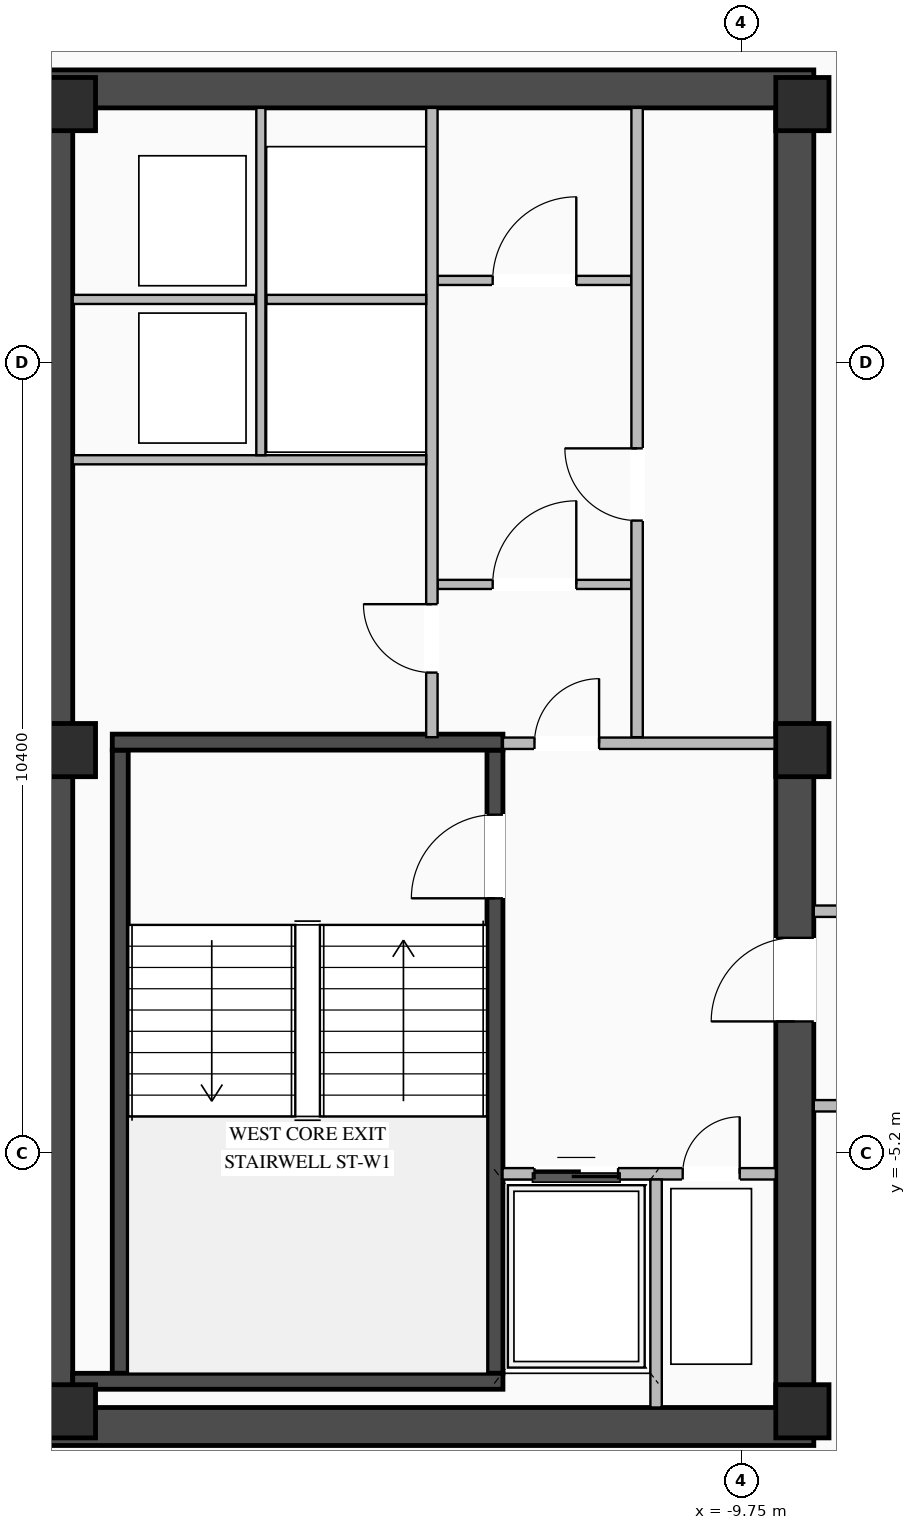
"""IFC4 building model, lengths in metres.
Left out: names, types, materials, properties, quantities, classifications, styles, units other than length and angle.
Written with IfcOpenShell. Run it as: python <this file> out.ifc"""

import sys

from ifc_helpers import new_model, si_unit, direction, frame, frame_2d, origin, origin_2d, place, context, subcontext, project, spatial, rectangle, extrude, element, fill, save


model = new_model("IFC4")
c1 = context("Model", 3, precision=1e-05, world=origin(), true_north=direction((0.0, 1.0)))
c2 = subcontext(c1, "Body", "Model", "MODEL_VIEW")
j1 = project(units=[si_unit("LENGTHUNIT", "METRE"), si_unit("PLANEANGLEUNIT", "RADIAN")], contexts=[c1])
p1 = place(None, origin())
s1 = spatial("IfcSite", under=j1, at=p1, CompositionType="ELEMENT")
p2 = place(p1, origin())
s2 = spatial("IfcBuilding", under=s1, at=p2, CompositionType="ELEMENT")
p3 = place(p2, frame((0.0, 0.0, 286.95)))
s3 = spatial("IfcBuildingStorey", under=s2, at=p3, CompositionType="ELEMENT", Elevation=286.95)
for number, where, z_axis, x_axis in (
    (1, (-19.05, -8.8, 0.0), (0.0, 0.0, 1.0), (1.0, 0.0, 0.0)),
    (2, (-19.05, 8.8, 0.0), (0.0, 0.0, 1.0), (1.0, 0.0, 0.0)),
):
    element("IfcWall", number, at=place(p3, frame(where, z_axis=z_axis, x_axis=x_axis)), inside=s3, PredefinedType="SHEAR", context=c2, shape_type="SweptSolid", body=[
        extrude(rectangle(XDim=10.25, YDim=0.5, at=frame_2d((5.125, 0.0))), origin(), (0.0, 0.0, 1.0), 3.35),
    ])
p4 = place(p3, frame((-18.8, -8.55, 0.0), z_axis=(0.0, 0.0, 1.0), x_axis=(0.0, 1.0, 0.0)))
e3 = element("IfcWall", 3, at=p4, inside=s3, PredefinedType="SHEAR", context=c2, shape_type="SweptSolid", body=[
    extrude(rectangle(XDim=17.1, YDim=0.5, at=frame_2d((8.55, 0.0))), origin(), (0.0, 0.0, 1.0), 3.35),
])
p5 = place(p3, frame((-9.05, -8.55, 0.0), z_axis=(0.0, 0.0, 1.0), x_axis=(0.0, 1.0, 0.0)))
e4 = element("IfcWall", 4, at=p5, inside=s3, PredefinedType="SHEAR", context=c2, shape_type="SweptSolid", body=[
    extrude(rectangle(XDim=17.1, YDim=0.5, at=frame_2d((8.55, 0.0))), origin(), (0.0, 0.0, 1.0), 3.35),
])
p6 = place(p5, frame((5.08, 0.0, 0.0)))
e5 = element("IfcOpeningElement", 5, at=p6, cuts=e4, PredefinedType="OPENING", context=c2, shape_type="SweptSolid", body=[
    extrude(rectangle(XDim=1.1, YDim=2.08, at=frame_2d((0.55, 1.04))), frame((0.0, 0.26, 0.0), z_axis=(0.0, -1.0, 0.0), x_axis=(1.0, 0.0, 0.0)), (0.0, 0.0, 1.0), 0.52),
])
p7 = place(p3, frame((-12.995, -8.1, 0.0), z_axis=(0.0, 0.0, 1.0), x_axis=(0.0, 1.0, 0.0)))
e6 = element("IfcWall", 6, at=p7, inside=s3, PredefinedType="SHEAR", context=c2, shape_type="SweptSolid", body=[
    extrude(rectangle(XDim=8.2, YDim=0.21, at=frame_2d((4.1, 0.0))), origin(), (0.0, 0.0, 1.0), 3.35),
])
p8 = place(p7, frame((6.25, 0.0, 0.0)))
e7 = element("IfcOpeningElement", 7, at=p8, cuts=e6, PredefinedType="OPENING", context=c2, shape_type="SweptSolid", body=[
    extrude(rectangle(XDim=1.1, YDim=2.15, at=frame_2d((0.55, 1.075))), frame((0.0, 0.115, 0.0), z_axis=(0.0, -1.0, 0.0), x_axis=(1.0, 0.0, 0.0)), (0.0, 0.0, 1.0), 0.23),
])
p9 = place(p3, frame((-17.925, -8.1, 0.0), z_axis=(0.0, 0.0, 1.0), x_axis=(0.0, 1.0, 0.0)))
e8 = element("IfcWall", 8, at=p9, inside=s3, PredefinedType="SHEAR", context=c2, shape_type="SweptSolid", body=[
    extrude(rectangle(XDim=8.2, YDim=0.21, at=frame_2d((4.1, 0.0))), origin(), (0.0, 0.0, 1.0), 3.35),
])
p10 = place(p3, frame((-18.55, -8.205, 0.0), z_axis=(0.0, 0.0, 1.0), x_axis=(1.0, 0.0, 0.0)))
e9 = element("IfcWall", 9, at=p10, inside=s3, PredefinedType="SHEAR", context=c2, shape_type="SweptSolid", body=[
    extrude(rectangle(XDim=5.66, YDim=0.21, at=frame_2d((2.83, 0.0))), origin(), (0.0, 0.0, 1.0), 3.35),
])
p11 = place(p3, frame((-12.89, 0.205, 0.0), z_axis=(0.0, 0.0, 1.0), x_axis=(-1.0, 0.0, 0.0)))
e10 = element("IfcWall", 10, at=p11, inside=s3, PredefinedType="SHEAR", context=c2, shape_type="SweptSolid", body=[
    extrude(rectangle(XDim=5.14, YDim=0.21, at=frame_2d((2.57, 0.0))), origin(), (0.0, 0.0, 1.0), 3.35),
])
for number, where, z_axis, x_axis in (
    (11, (-8.95, -8.6, 0.0), (0.0, 0.0, 1.0), (1.0, 0.0, 0.0)),
    (12, (-8.95, 0.1, 0.0), (0.0, 0.0, 1.0), (1.0, 0.0, 0.0)),
    (13, (-8.95, 8.6, 0.0), (0.0, 0.0, 1.0), (1.0, 0.0, 0.0)),
    (14, (-18.6, -8.6, 0.0), (0.0, 0.0, 1.0), (1.0, 0.0, 0.0)),
    (15, (-18.6, 0.1, 0.0), (0.0, 0.0, 1.0), (1.0, 0.0, 0.0)),
    (16, (-18.6, 8.6, 0.0), (0.0, 0.0, 1.0), (1.0, 0.0, 0.0)),
):
    element("IfcColumn", number, at=place(p3, frame(where, z_axis=z_axis, x_axis=x_axis)), inside=s3, PredefinedType="COLUMN", context=c2, shape_type="SweptSolid", body=[
        extrude(rectangle(XDim=0.7, YDim=0.7, at=origin_2d()), origin(), (0.0, 0.0, 1.0), 3.6),
    ])
p12 = place(p3, frame((-12.895, -5.475, 0.0), z_axis=(0.0, 0.0, 1.0), x_axis=(1.0, 0.0, 0.0)))
e17 = element("IfcWall", 17, at=p12, inside=s3, PredefinedType="STANDARD", context=c2, shape_type="SweptSolid", body=[
    extrude(rectangle(XDim=3.595, YDim=0.15, at=frame_2d((1.797, 0.0))), origin(), (0.0, 0.0, 1.0), 3.33),
])
p13 = place(p12, frame((0.42, 0.0, 0.0)))
e18 = element("IfcOpeningElement", 18, at=p13, cuts=e17, PredefinedType="OPENING", context=c2, shape_type="SweptSolid", body=[
    extrude(rectangle(XDim=1.1, YDim=2.15, at=frame_2d((0.55, 1.075))), frame((0.0, 0.085, 0.0), z_axis=(0.0, -1.0, 0.0), x_axis=(1.0, 0.0, 0.0)), (0.0, 0.0, 1.0), 0.17),
])
p14 = place(p12, frame((2.37, 0.0, 0.0)))
e19 = element("IfcOpeningElement", 19, at=p14, cuts=e17, PredefinedType="OPENING", context=c2, shape_type="SweptSolid", body=[
    extrude(rectangle(XDim=0.75, YDim=2.05, at=frame_2d((0.375, 1.025))), frame((0.0, 0.085, 0.0), z_axis=(0.0, -1.0, 0.0), x_axis=(1.0, 0.0, 0.0)), (0.0, 0.0, 1.0), 0.17),
])
p15 = place(p3, frame((-10.875, -8.55, 0.0), z_axis=(0.0, 0.0, 1.0), x_axis=(0.0, 1.0, 0.0)))
e20 = element("IfcWall", 20, at=p15, inside=s3, PredefinedType="STANDARD", context=c2, shape_type="SweptSolid", body=[
    extrude(rectangle(XDim=3.0, YDim=0.15, at=frame_2d((1.5, 0.0))), origin(), (0.0, 0.0, 1.0), 3.33),
])
p16 = place(p3, frame((-12.89, 0.19, 0.0), z_axis=(0.0, 0.0, 1.0), x_axis=(1.0, 0.0, 0.0)))
e21 = element("IfcWall", 21, at=p16, inside=s3, PredefinedType="STANDARD", context=c2, shape_type="SweptSolid", body=[
    extrude(rectangle(XDim=3.59, YDim=0.15, at=frame_2d((1.795, 0.0))), origin(), (0.0, 0.0, 1.0), 2.825),
])
p17 = place(p16, frame((0.415, 0.0, 0.0)))
e22 = element("IfcOpeningElement", 22, at=p17, cuts=e21, PredefinedType="OPENING", context=c2, shape_type="SweptSolid", body=[
    extrude(rectangle(XDim=0.85, YDim=2.04, at=frame_2d((0.425, 1.02))), frame((0.0, 0.085, 0.0), z_axis=(0.0, -1.0, 0.0), x_axis=(1.0, 0.0, 0.0)), (0.0, 0.0, 1.0), 0.17),
])
p18 = place(p3, frame((-13.75, 2.28, 0.0), z_axis=(0.0, 0.0, 1.0), x_axis=(1.0, 0.0, 0.0)))
e23 = element("IfcWall", 23, at=p18, inside=s3, PredefinedType="STANDARD", context=c2, shape_type="SweptSolid", body=[
    extrude(rectangle(XDim=2.55, YDim=0.12, at=frame_2d((1.275, 0.0))), origin(), (0.0, 0.0, 1.0), 3.33),
])
p19 = place(p18, frame((0.725, 0.0, 0.0)))
e24 = element("IfcOpeningElement", 24, at=p19, cuts=e23, PredefinedType="OPENING", context=c2, shape_type="SweptSolid", body=[
    extrude(rectangle(XDim=1.1, YDim=2.1, at=frame_2d((0.55, 1.05))), frame((0.0, 0.07, 0.0), z_axis=(0.0, -1.0, 0.0), x_axis=(1.0, 0.0, 0.0)), (0.0, 0.0, 1.0), 0.14),
])
p20 = place(p3, frame((-13.75, 6.28, 0.0), z_axis=(0.0, 0.0, 1.0), x_axis=(1.0, 0.0, 0.0)))
e25 = element("IfcWall", 25, at=p20, inside=s3, PredefinedType="STANDARD", context=c2, shape_type="SweptSolid", body=[
    extrude(rectangle(XDim=2.55, YDim=0.12, at=frame_2d((1.275, 0.0))), origin(), (0.0, 0.0, 1.0), 3.33),
])
p21 = place(p20, frame((0.725, 0.0, 0.0)))
e26 = element("IfcOpeningElement", 26, at=p21, cuts=e25, PredefinedType="OPENING", context=c2, shape_type="SweptSolid", body=[
    extrude(rectangle(XDim=1.1, YDim=2.1, at=frame_2d((0.55, 1.05))), frame((0.0, 0.07, 0.0), z_axis=(0.0, -1.0, 0.0), x_axis=(1.0, 0.0, 0.0)), (0.0, 0.0, 1.0), 0.14),
])
p22 = place(p3, frame((-11.125, 0.27, 0.0), z_axis=(0.0, 0.0, 1.0), x_axis=(0.0, 1.0, 0.0)))
e27 = element("IfcWall", 27, at=p22, inside=s3, PredefinedType="STANDARD", context=c2, shape_type="SweptSolid", body=[
    extrude(rectangle(XDim=8.28, YDim=0.15, at=frame_2d((4.14, 0.0))), origin(), (0.0, 0.0, 1.0), 3.33),
])
p23 = place(p22, frame((2.85, 0.0, 0.0)))
e28 = element("IfcOpeningElement", 28, at=p23, cuts=e27, PredefinedType="OPENING", context=c2, shape_type="SweptSolid", body=[
    extrude(rectangle(XDim=0.95, YDim=2.05, at=frame_2d((0.475, 1.025))), frame((0.0, 0.085, 0.0), z_axis=(0.0, -1.0, 0.0), x_axis=(1.0, 0.0, 0.0)), (0.0, 0.0, 1.0), 0.17),
])
p24 = place(p3, frame((-13.825, 0.27, 0.0), z_axis=(0.0, 0.0, 1.0), x_axis=(0.0, 1.0, 0.0)))
e29 = element("IfcWall", 29, at=p24, inside=s3, PredefinedType="STANDARD", context=c2, shape_type="SweptSolid", body=[
    extrude(rectangle(XDim=8.28, YDim=0.15, at=frame_2d((4.14, 0.0))), origin(), (0.0, 0.0, 1.0), 3.33),
])
p25 = place(p24, frame((0.85, 0.0, 0.0)))
e30 = element("IfcOpeningElement", 30, at=p25, cuts=e29, PredefinedType="OPENING", context=c2, shape_type="SweptSolid", body=[
    extrude(rectangle(XDim=0.9, YDim=2.05, at=frame_2d((0.45, 1.025))), frame((0.0, 0.085, 0.0), z_axis=(0.0, -1.0, 0.0), x_axis=(1.0, 0.0, 0.0)), (0.0, 0.0, 1.0), 0.17),
])
p26 = place(p3, frame((-18.55, 3.92, 0.0), z_axis=(0.0, 0.0, 1.0), x_axis=(1.0, 0.0, 0.0)))
e31 = element("IfcWall", 31, at=p26, inside=s3, PredefinedType="STANDARD", context=c2, shape_type="SweptSolid", body=[
    extrude(rectangle(XDim=4.65, YDim=0.12, at=frame_2d((2.325, 0.0))), origin(), (0.0, 0.0, 1.0), 3.33),
])
p27 = place(p3, frame((-18.55, 6.03, 0.0), z_axis=(0.0, 0.0, 1.0), x_axis=(1.0, 0.0, 0.0)))
e32 = element("IfcWall", 32, at=p27, inside=s3, PredefinedType="STANDARD", context=c2, shape_type="SweptSolid", body=[
    extrude(rectangle(XDim=2.4, YDim=0.12, at=frame_2d((1.2, 0.0))), origin(), (0.0, 0.0, 1.0), 3.33),
])
p28 = place(p3, frame((-16.075, 3.98, 0.0), z_axis=(0.0, 0.0, 1.0), x_axis=(0.0, 1.0, 0.0)))
e33 = element("IfcWall", 33, at=p28, inside=s3, PredefinedType="STANDARD", context=c2, shape_type="SweptSolid", body=[
    extrude(rectangle(XDim=4.57, YDim=0.12, at=frame_2d((2.285, 0.0))), origin(), (0.0, 0.0, 1.0), 3.33),
])
p29 = place(p3, frame((-16.0, 6.03, 0.0), z_axis=(0.0, 0.0, 1.0), x_axis=(1.0, 0.0, 0.0)))
e34 = element("IfcWall", 34, at=p29, inside=s3, PredefinedType="STANDARD", context=c2, shape_type="SweptSolid", body=[
    extrude(rectangle(XDim=2.1, YDim=0.12, at=frame_2d((1.05, 0.0))), origin(), (0.0, 0.0, 1.0), 3.33),
])
p30 = place(p3, frame((-8.8, -2.02, 0.0), z_axis=(0.0, 0.0, 1.0), x_axis=(1.0, 0.0, 0.0)))
e35 = element("IfcWall", 35, at=p30, inside=s3, PredefinedType="STANDARD", context=c2, shape_type="SweptSolid", body=[
    extrude(rectangle(XDim=17.6, YDim=0.15, at=frame_2d((8.8, 0.0))), origin(), (0.0, 0.0, 1.0), 3.33),
])
p31 = place(p30, frame((4.6, 0.0, 0.0)))
e36 = element("IfcOpeningElement", 36, at=p31, cuts=e35, PredefinedType="OPENING", context=c2, shape_type="SweptSolid", body=[
    extrude(rectangle(XDim=1.0, YDim=2.02, at=frame_2d((0.5, 1.01))), frame((0.0, 0.085, 0.0), z_axis=(0.0, -1.0, 0.0), x_axis=(1.0, 0.0, 0.0)), (0.0, 0.0, 1.0), 0.17),
])
p32 = place(p30, frame((13.4, 0.0, 0.0)))
e37 = element("IfcOpeningElement", 37, at=p32, cuts=e35, PredefinedType="OPENING", context=c2, shape_type="SweptSolid", body=[
    extrude(rectangle(XDim=1.0, YDim=2.02, at=frame_2d((0.5, 1.01))), frame((0.0, 0.085, 0.0), z_axis=(0.0, -1.0, 0.0), x_axis=(1.0, 0.0, 0.0)), (0.0, 0.0, 1.0), 0.17),
])
p33 = place(p3, frame((-8.8, -4.58, 0.0), z_axis=(0.0, 0.0, 1.0), x_axis=(1.0, 0.0, 0.0)))
e38 = element("IfcWall", 38, at=p33, inside=s3, PredefinedType="STANDARD", context=c2, shape_type="SweptSolid", body=[
    extrude(rectangle(XDim=17.6, YDim=0.15, at=frame_2d((8.8, 0.0))), origin(), (0.0, 0.0, 1.0), 3.33),
])
p34 = place(p33, frame((4.6, 0.0, 0.0)))
e39 = element("IfcOpeningElement", 39, at=p34, cuts=e38, PredefinedType="OPENING", context=c2, shape_type="SweptSolid", body=[
    extrude(rectangle(XDim=1.0, YDim=2.02, at=frame_2d((0.5, 1.01))), frame((0.0, 0.085, 0.0), z_axis=(0.0, -1.0, 0.0), x_axis=(1.0, 0.0, 0.0)), (0.0, 0.0, 1.0), 0.17),
])
p35 = place(p8, origin())
e40 = element("IfcDoor", 40, at=p35, inside=s3, OperationType="SINGLE_SWING_LEFT", PredefinedType="DOOR", context=c2, shape_type="SweptSolid", body=[
    extrude(rectangle(XDim=1.1, YDim=2.15, at=frame_2d((0.55, 1.075))), frame((0.0, 0.025, 0.0), z_axis=(0.0, -1.0, 0.0), x_axis=(1.0, 0.0, 0.0)), (0.0, 0.0, 1.0), 0.05),
])
fill(e7, e40)
p36 = place(p13, origin())
e41 = element("IfcDoor", 41, at=p36, inside=s3, OperationType="DOUBLE_DOOR_SLIDING", PredefinedType="DOOR", context=c2, shape_type="SweptSolid", body=[
    extrude(rectangle(XDim=1.1, YDim=2.15, at=frame_2d((0.55, 1.075))), frame((0.0, 0.025, 0.0), z_axis=(0.0, -1.0, 0.0), x_axis=(1.0, 0.0, 0.0)), (0.0, 0.0, 1.0), 0.05),
])
fill(e18, e41)
p37 = place(p14, origin())
e42 = element("IfcDoor", 42, at=p37, inside=s3, OperationType="SINGLE_SWING_RIGHT", PredefinedType="DOOR", context=c2, shape_type="SweptSolid", body=[
    extrude(rectangle(XDim=0.75, YDim=2.05, at=frame_2d((0.375, 1.025))), frame((0.0, 0.025, 0.0), z_axis=(0.0, -1.0, 0.0), x_axis=(1.0, 0.0, 0.0)), (0.0, 0.0, 1.0), 0.05),
])
fill(e19, e42)
p38 = place(p17, origin())
e43 = element("IfcDoor", 43, at=p38, inside=s3, OperationType="SINGLE_SWING_RIGHT", PredefinedType="DOOR", context=c2, shape_type="SweptSolid", body=[
    extrude(rectangle(XDim=0.85, YDim=2.04, at=frame_2d((0.425, 1.02))), frame((0.0, 0.025, 0.0), z_axis=(0.0, -1.0, 0.0), x_axis=(1.0, 0.0, 0.0)), (0.0, 0.0, 1.0), 0.05),
])
fill(e22, e43)
p39 = place(p6, origin())
e44 = element("IfcDoor", 44, at=p39, inside=s3, OperationType="SINGLE_SWING_LEFT", PredefinedType="DOOR", context=c2, shape_type="SweptSolid", body=[
    extrude(rectangle(XDim=1.1, YDim=2.08, at=frame_2d((0.55, 1.04))), frame((0.0, 0.205, 0.0), z_axis=(0.0, -1.0, 0.0), x_axis=(1.0, 0.0, 0.0)), (0.0, 0.0, 1.0), 0.05),
])
fill(e5, e44)
p40 = place(p19, origin())
e45 = element("IfcDoor", 45, at=p40, inside=s3, OperationType="SINGLE_SWING_RIGHT", PredefinedType="DOOR", context=c2, shape_type="SweptSolid", body=[
    extrude(rectangle(XDim=1.1, YDim=2.1, at=frame_2d((0.55, 1.05))), frame((0.0, 0.025, 0.0), z_axis=(0.0, -1.0, 0.0), x_axis=(1.0, 0.0, 0.0)), (0.0, 0.0, 1.0), 0.05),
])
fill(e24, e45)
p41 = place(p21, origin())
e46 = element("IfcDoor", 46, at=p41, inside=s3, OperationType="SINGLE_SWING_RIGHT", PredefinedType="DOOR", context=c2, shape_type="SweptSolid", body=[
    extrude(rectangle(XDim=1.1, YDim=2.1, at=frame_2d((0.55, 1.05))), frame((0.0, 0.025, 0.0), z_axis=(0.0, -1.0, 0.0), x_axis=(1.0, 0.0, 0.0)), (0.0, 0.0, 1.0), 0.05),
])
fill(e26, e46)
p42 = place(p23, origin())
e47 = element("IfcDoor", 47, at=p42, inside=s3, OperationType="SINGLE_SWING_RIGHT", PredefinedType="DOOR", context=c2, shape_type="SweptSolid", body=[
    extrude(rectangle(XDim=0.95, YDim=2.05, at=frame_2d((0.475, 1.025))), frame((0.0, 0.025, 0.0), z_axis=(0.0, -1.0, 0.0), x_axis=(1.0, 0.0, 0.0)), (0.0, 0.0, 1.0), 0.05),
])
fill(e28, e47)
p43 = place(p25, origin())
e48 = element("IfcDoor", 48, at=p43, inside=s3, OperationType="SINGLE_SWING_RIGHT", PredefinedType="DOOR", context=c2, shape_type="SweptSolid", body=[
    extrude(rectangle(XDim=0.9, YDim=2.05, at=frame_2d((0.45, 1.025))), frame((0.0, 0.025, 0.0), z_axis=(0.0, -1.0, 0.0), x_axis=(1.0, 0.0, 0.0)), (0.0, 0.0, 1.0), 0.05),
])
fill(e30, e48)
save(model, sys.argv[1])
